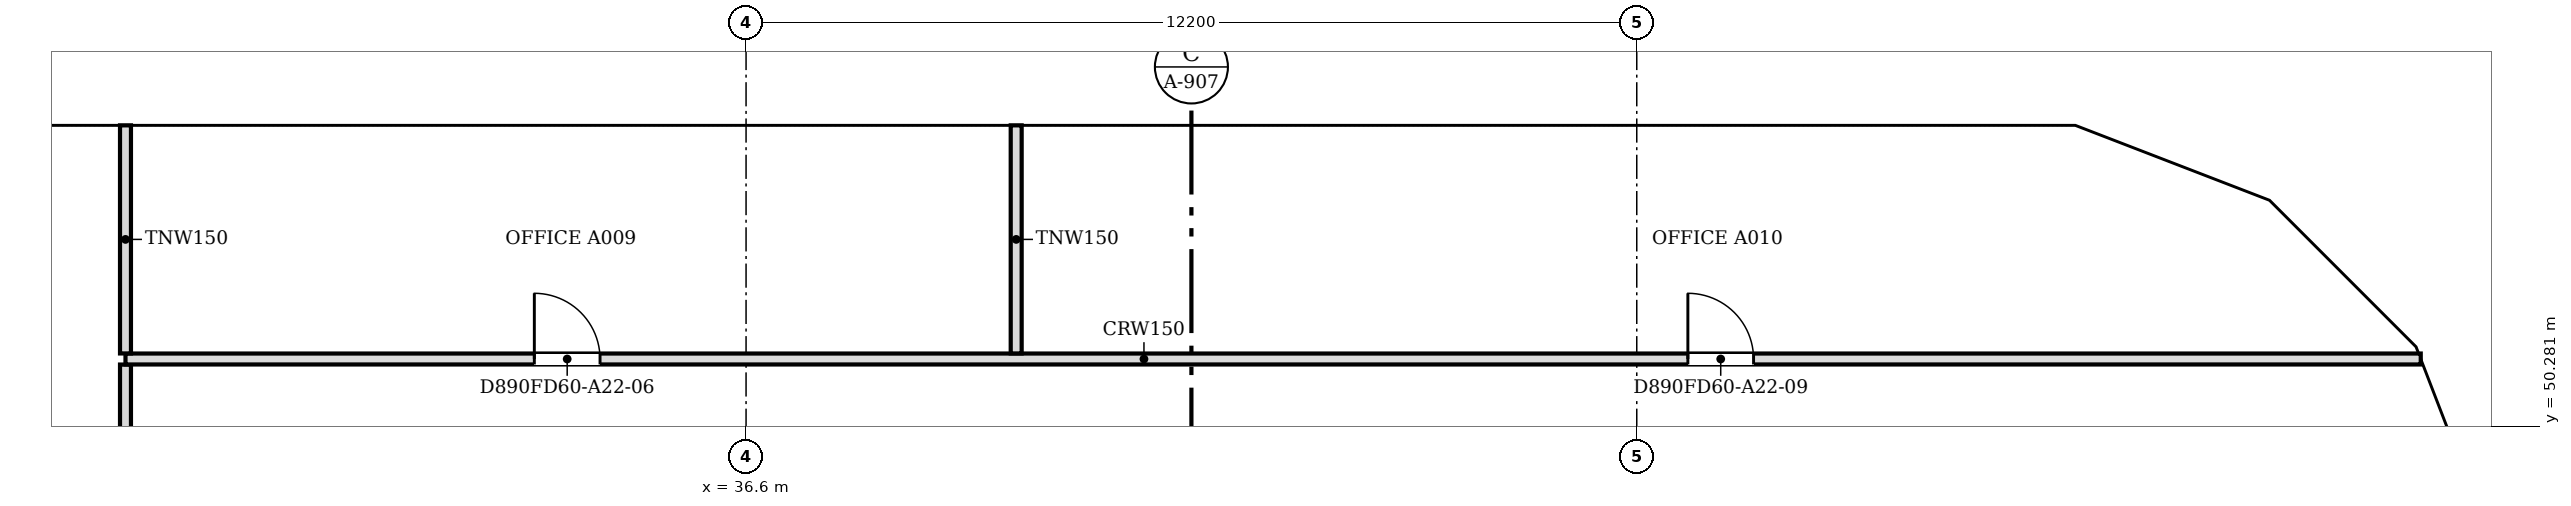
"""IFC4 building model, lengths in metres.
Left out: names, types, materials, properties, quantities, classifications, styles, units other than length and angle.
Written with IfcOpenShell. Run it as: python <this file> out.ifc"""

import sys

from ifc_helpers import new_model, si_unit, direction, frame, frame_2d, origin, place, context, subcontext, project, spatial, polyline, rectangle, outline, extrude, faceted_brep, source, transform, mapped, element, fill, save


model = new_model("IFC4")
c1 = context("Model", 3, precision=1e-05, world=origin(), true_north=direction((0.0, 1.0)))
c2 = subcontext(c1, "Body", "Model", "MODEL_VIEW")
j1 = project(units=[si_unit("LENGTHUNIT", "METRE"), si_unit("PLANEANGLEUNIT", "RADIAN")], contexts=[c1])
p1 = place(None, origin())
s1 = spatial("IfcSite", under=j1, at=p1, CompositionType="ELEMENT")
p2 = place(p1, origin())
s2 = spatial("IfcBuilding", under=s1, at=p2, CompositionType="ELEMENT")
p3 = place(p2, frame((0.0, 0.0, 255.9)))
s3 = spatial("IfcBuildingStorey", under=s2, at=p3, CompositionType="ELEMENT", Elevation=255.9)
m1 = source(origin(), c2, "Body", "Brep", [
    faceted_brep([(0.047, -0.25, 0.0), (2.997, -0.25, 3.8), (0.047, -0.25, 7.6), (0.0, -0.25, 7.541), (0.0, -0.25, 0.059), (0.093, 0.25, 7.54), (2.944, 0.25, 3.868), (2.944, 0.25, 3.732), (0.093, 0.25, 0.06), (2.997, 0.0, 3.8), (0.047, 0.0, 0.0), (0.047, 0.0, 7.6)], [[[0, 1, 2, 3, 4]], [[5, 6, 7, 8]], [[8, 7, 9, 1, 0, 10]], [[6, 5, 11, 2, 1, 9]], [[3, 2, 11]], [[10, 0, 4]], [[8, 10, 4, 3, 11, 5]], [[9, 7, 6]]]),
])
p4 = place(p3, frame((60.767, 48.71, -3.8), z_axis=(0.0, 0.0, 1.0), x_axis=(-0.359901446078, 0.932990326376, 0.0)))
e1 = element("IfcWall", 1, at=p4, inside=s3, PredefinedType="SOLIDWALL", context=c2, shape_type="MappedRepresentation", body=[
    mapped(m1, transform((0.0, 0.0, 0.0), scale=1.0)),
])
m2 = source(origin(), c2, "Body", "SweptSolid", [
    extrude(outline(polyline([(0.247, 0.665), (2.681, 3.8), (0.247, 6.935), (0.247, 0.665)])), frame((0.0, 0.26, 0.0), z_axis=(0.0, -1.0, 0.0), x_axis=(1.0, 0.0, 0.0)), (0.0, 0.0, 1.0), 0.52),
])
p5 = place(p4, origin())
e2 = element("IfcOpeningElement", 2, at=p5, cuts=e1, PredefinedType="OPENING", context=c2, shape_type="MappedRepresentation", body=[
    mapped(m2, transform((0.0, 0.0, 0.0), scale=1.0)),
])
m3 = source(origin(), c2, "Body", "Brep", [
    faceted_brep([(2.944, -0.25, 0.0), (2.997, -0.25, 0.068), (2.997, -0.25, 7.532), (2.944, -0.25, 7.6), (0.0, -0.25, 3.8), (0.053, 0.25, 3.868), (2.891, 0.25, 7.532), (2.891, 0.25, 0.068), (0.053, 0.25, 3.731), (2.944, 0.0, 0.0), (2.944, 0.0, 7.6), (0.0, 0.0, 3.8)], [[[0, 1, 2, 3, 4]], [[5, 6, 7, 8]], [[1, 0, 9]], [[10, 3, 2]], [[6, 5, 11, 4, 3, 10]], [[8, 7, 9, 0, 4, 11]], [[8, 11, 5]], [[1, 9, 7, 6, 10, 2]]]),
])
p6 = place(p3, frame((59.688, 51.506, -3.8), z_axis=(0.0, 0.0, 1.0), x_axis=(-0.707106781187, 0.707106781187, 0.0)))
e3 = element("IfcWall", 3, at=p6, inside=s3, PredefinedType="SOLIDWALL", context=c2, shape_type="MappedRepresentation", body=[
    mapped(m3, transform((0.0, 0.0, 0.0), scale=1.0)),
])
m4 = source(origin(), c2, "Body", "SweptSolid", [
    extrude(outline(polyline([(2.744, 6.934), (0.316, 3.8), (2.744, 0.666), (2.744, 6.934)])), frame((0.0, 0.26, 0.0), z_axis=(0.0, -1.0, 0.0), x_axis=(1.0, 0.0, 0.0)), (0.0, 0.0, 1.0), 0.52),
])
p7 = place(p6, origin())
e4 = element("IfcOpeningElement", 4, at=p7, cuts=e3, PredefinedType="OPENING", context=c2, shape_type="MappedRepresentation", body=[
    mapped(m4, transform((0.0, 0.0, 0.0), scale=1.0)),
])
m5 = source(origin(), c2, "Body", "Brep", [
    faceted_brep([(0.053, -0.25, 0.0), (3.003, -0.25, 3.8), (0.053, -0.25, 7.6), (0.0, -0.25, 7.531), (0.0, -0.25, 0.068), (0.106, 0.25, 7.532), (2.957, 0.25, 3.86), (2.957, 0.25, 3.74), (0.106, 0.25, 0.068), (3.003, 0.0, 3.8), (0.053, 0.0, 0.0), (0.053, 0.0, 7.6)], [[[0, 1, 2, 3, 4]], [[5, 6, 7, 8]], [[8, 7, 9, 1, 0, 10]], [[6, 5, 11, 2, 1, 9]], [[3, 2, 11]], [[10, 0, 4]], [[8, 10, 4, 3, 11, 5]], [[9, 7, 6]]]),
])
p8 = place(p3, frame((57.656, 53.569, -3.8), z_axis=(0.0, 0.0, 1.0), x_axis=(-0.933007896601, 0.359855894603, 0.0)))
e5 = element("IfcWall", 5, at=p8, inside=s3, PredefinedType="SOLIDWALL", context=c2, shape_type="MappedRepresentation", body=[
    mapped(m5, transform((0.0, 0.0, 0.0), scale=1.0)),
])
m6 = source(origin(), c2, "Body", "SweptSolid", [
    extrude(outline(polyline([(0.253, 0.665), (2.687, 3.8), (0.253, 6.935), (0.253, 0.665)])), frame((0.0, 0.26, 0.0), z_axis=(0.0, -1.0, 0.0), x_axis=(1.0, 0.0, 0.0)), (0.0, 0.0, 1.0), 0.52),
])
p9 = place(p8, origin())
e6 = element("IfcOpeningElement", 6, at=p9, cuts=e5, PredefinedType="OPENING", context=c2, shape_type="MappedRepresentation", body=[
    mapped(m6, transform((0.0, 0.0, 0.0), scale=1.0)),
])
m7 = source(origin(), c2, "Body", "Brep", [
    faceted_brep([(3.003, -0.25, 0.0), (6.053, -0.25, 3.8), (3.003, -0.25, 7.6), (0.0, -0.25, 3.8), (0.047, 0.25, 3.859), (3.003, 0.25, 7.6), (6.053, 0.25, 3.8), (3.003, 0.25, 0.0), (0.047, 0.25, 3.741), (0.0, 0.0, 3.8)], [[[0, 1, 2, 3]], [[4, 5, 6, 7, 8]], [[7, 6, 1, 0]], [[6, 5, 2, 1]], [[5, 4, 9, 3, 2]], [[8, 7, 0, 3, 9]], [[8, 9, 4]]]),
])
p10 = place(p3, frame((54.854, 54.65, -3.8), z_axis=(0.0, 0.0, 1.0), x_axis=(-1.0, 0.0, 0.0)))
e7 = element("IfcWall", 7, at=p10, inside=s3, PredefinedType="SOLIDWALL", context=c2, shape_type="MappedRepresentation", body=[
    mapped(m7, transform((0.0, 0.0, 0.0), scale=1.0)),
])
m8 = source(origin(), c2, "Body", "SweptSolid", [
    extrude(outline(polyline([(3.005, 0.401), (5.733, 3.8), (3.005, 7.199), (0.319, 3.8), (3.005, 0.401)])), frame((0.0, 0.26, 0.0), z_axis=(0.0, -1.0, 0.0), x_axis=(1.0, 0.0, 0.0)), (0.0, 0.0, 1.0), 0.52),
])
p11 = place(p10, origin())
e8 = element("IfcOpeningElement", 8, at=p11, cuts=e7, PredefinedType="OPENING", context=c2, shape_type="MappedRepresentation", body=[
    mapped(m8, transform((0.0, 0.0, 0.0), scale=1.0)),
])
m9 = source(origin(), c2, "Body", "SweptSolid", [
    extrude(outline(polyline([(3.05, 0.0), (6.1, 3.8), (3.05, 7.6), (0.0, 3.8), (3.05, 0.0)])), frame((0.0, 0.25, 0.0), z_axis=(0.0, -1.0, 0.0), x_axis=(1.0, 0.0, 0.0)), (0.0, 0.0, 1.0), 0.5),
])
p12 = place(p3, frame((48.8, 54.65, -3.8), z_axis=(0.0, 0.0, 1.0), x_axis=(-1.0, 0.0, 0.0)))
e9 = element("IfcWall", 9, at=p12, inside=s3, PredefinedType="SOLIDWALL", context=c2, shape_type="MappedRepresentation", body=[
    mapped(m9, transform((0.0, 0.0, 0.0), scale=1.0)),
])
m10 = source(origin(), c2, "Body", "SweptSolid", [
    extrude(outline(polyline([(3.05, 0.399), (5.78, 3.8), (3.05, 7.2), (0.321, 3.8), (3.05, 0.399)])), frame((0.0, 0.26, 0.0), z_axis=(0.0, -1.0, 0.0), x_axis=(1.0, 0.0, 0.0)), (0.0, 0.0, 1.0), 0.52),
])
p13 = place(p12, origin())
e10 = element("IfcOpeningElement", 10, at=p13, cuts=e9, PredefinedType="OPENING", context=c2, shape_type="MappedRepresentation", body=[
    mapped(m10, transform((0.0, 0.0, 0.0), scale=1.0)),
])
m11 = source(origin(), c2, "Body", "Brep", [
    faceted_brep([(3.05, -0.25, 0.0), (6.1, -0.25, 3.8), (6.1, -0.25, 3.8), (3.05, -0.25, 7.6), (0.0, -0.25, 3.8), (0.0, 0.25, 3.8), (3.05, 0.25, 7.6), (6.1, 0.25, 3.8), (6.1, 0.25, 3.8), (3.05, 0.25, 0.0)], [[[0, 1, 2, 3, 4]], [[5, 6, 7, 8, 9]], [[9, 8, 1, 0]], [[7, 6, 3, 2]], [[6, 5, 4, 3]], [[5, 9, 0, 4]], [[1, 8, 7, 2]]]),
])
p14 = place(p3, frame((42.7, 54.65, -3.8), z_axis=(0.0, 0.0, 1.0), x_axis=(-1.0, 0.0, 0.0)))
e11 = element("IfcWall", 11, at=p14, inside=s3, PredefinedType="SOLIDWALL", context=c2, shape_type="MappedRepresentation", body=[
    mapped(m11, transform((0.0, 0.0, 0.0), scale=1.0)),
])
p15 = place(p14, origin())
e12 = element("IfcOpeningElement", 12, at=p15, cuts=e11, PredefinedType="OPENING", context=c2, shape_type="MappedRepresentation", body=[
    mapped(m10, transform((0.0, 0.0, 0.0), scale=1.0)),
])
p16 = place(p3, frame((36.6, 54.65, -3.8), z_axis=(0.0, 0.0, 1.0), x_axis=(-1.0, 0.0, 0.0)))
e13 = element("IfcWall", 13, at=p16, inside=s3, PredefinedType="SOLIDWALL", context=c2, shape_type="MappedRepresentation", body=[
    mapped(m9, transform((0.0, 0.0, 0.0), scale=1.0)),
])
p17 = place(p16, origin())
e14 = element("IfcOpeningElement", 14, at=p17, cuts=e13, PredefinedType="OPENING", context=c2, shape_type="MappedRepresentation", body=[
    mapped(m10, transform((0.0, 0.0, 0.0), scale=1.0)),
])
p18 = place(p3, frame((30.5, 54.65, -3.8), z_axis=(0.0, 0.0, 1.0), x_axis=(-1.0, 0.0, 0.0)))
e15 = element("IfcWall", 15, at=p18, inside=s3, PredefinedType="SOLIDWALL", context=c2, shape_type="MappedRepresentation", body=[
    mapped(m9, transform((0.0, 0.0, 0.0), scale=1.0)),
])
p19 = place(p18, origin())
e16 = element("IfcOpeningElement", 16, at=p19, cuts=e15, PredefinedType="OPENING", context=c2, shape_type="MappedRepresentation", body=[
    mapped(m10, transform((0.0, 0.0, 0.0), scale=1.0)),
])
m12 = source(origin(), c2, "Body", "Brep", [
    faceted_brep([(2.95, -0.25, 0.0), (3.003, -0.25, 0.068), (3.003, -0.25, 3.8), (0.0, -0.25, 3.8), (0.047, 0.25, 3.8), (2.898, 0.25, 3.8), (2.898, 0.25, 0.068), (0.047, 0.25, 3.74), (2.95, 0.0, 0.0), (0.0, 0.0, 3.8)], [[[0, 1, 2, 3]], [[4, 5, 6, 7]], [[1, 0, 8]], [[5, 4, 9, 3, 2]], [[7, 6, 8, 0, 3, 9]], [[7, 9, 4]], [[1, 8, 6, 5, 2]]]),
])
p20 = place(p3, frame((60.75, 48.753, 0.0), z_axis=(0.0, 0.0, 1.0), x_axis=(-0.35992665181, 0.932980602862, 0.0)))
e17 = element("IfcWall", 17, at=p20, inside=s3, PredefinedType="SOLIDWALL", context=c2, shape_type="MappedRepresentation", body=[
    mapped(m12, transform((0.0, 0.0, 0.0), scale=1.0)),
])
m13 = source(origin(), c2, "Body", "SweptSolid", [
    extrude(outline(polyline([(2.75, 3.55), (0.511, 3.55), (2.75, 0.665), (2.75, 3.55)])), frame((0.0, 0.26, 0.0), z_axis=(0.0, -1.0, 0.0), x_axis=(1.0, 0.0, 0.0)), (0.0, 0.0, 1.0), 0.52),
])
p21 = place(p20, origin())
e18 = element("IfcOpeningElement", 18, at=p21, cuts=e17, PredefinedType="OPENING", context=c2, shape_type="MappedRepresentation", body=[
    mapped(m13, transform((0.0, 0.0, 0.0), scale=1.0)),
])
m14 = source(origin(), c2, "Body", "Brep", [
    faceted_brep([(0.053, -0.25, 0.0), (2.997, -0.25, 3.8), (0.0, -0.25, 3.8), (0.0, -0.25, 0.068), (0.106, 0.25, 3.8), (2.944, 0.25, 3.8), (2.944, 0.25, 3.732), (0.106, 0.25, 0.068), (2.997, 0.0, 3.8), (0.053, 0.0, 0.0)], [[[0, 1, 2, 3]], [[4, 5, 6, 7]], [[7, 6, 8, 1, 0, 9]], [[5, 4, 2, 1, 8]], [[9, 0, 3]], [[7, 9, 3, 2, 4]], [[6, 5, 8]]]),
])
p22 = place(p3, frame((59.726, 51.469, 0.0), z_axis=(0.0, 0.0, 1.0), x_axis=(-0.707106781187, 0.707106781187, 0.0)))
e19 = element("IfcWall", 19, at=p22, inside=s3, PredefinedType="SOLIDWALL", context=c2, shape_type="MappedRepresentation", body=[
    mapped(m14, transform((0.0, 0.0, 0.0), scale=1.0)),
])
m15 = source(origin(), c2, "Body", "SweptSolid", [
    extrude(outline(polyline([(0.253, 0.667), (2.487, 3.55), (0.253, 3.55), (0.253, 0.667)])), frame((0.0, 0.26, 0.0), z_axis=(0.0, -1.0, 0.0), x_axis=(1.0, 0.0, 0.0)), (0.0, 0.0, 1.0), 0.52),
])
p23 = place(p22, origin())
e20 = element("IfcOpeningElement", 20, at=p23, cuts=e19, PredefinedType="OPENING", context=c2, shape_type="MappedRepresentation", body=[
    mapped(m15, transform((0.0, 0.0, 0.0), scale=1.0)),
])
m16 = source(origin(), c2, "Body", "Brep", [
    faceted_brep([(2.95, -0.25, 0.0), (2.997, -0.25, 0.059), (2.997, -0.25, 3.8), (0.0, -0.25, 3.8), (0.053, 0.25, 3.8), (2.904, 0.25, 3.8), (2.904, 0.25, 0.06), (0.053, 0.25, 3.732), (2.95, 0.0, 0.0), (0.0, 0.0, 3.8)], [[[0, 1, 2, 3]], [[4, 5, 6, 7]], [[1, 0, 8]], [[5, 4, 9, 3, 2]], [[7, 6, 8, 0, 3, 9]], [[7, 9, 4]], [[1, 8, 6, 5, 2]]]),
])
p24 = place(p3, frame((57.606, 53.588, 0.0), z_axis=(0.0, 0.0, 1.0), x_axis=(-0.932990326376, 0.359901446078, 0.0)))
e21 = element("IfcWall", 21, at=p24, inside=s3, PredefinedType="SOLIDWALL", context=c2, shape_type="MappedRepresentation", body=[
    mapped(m16, transform((0.0, 0.0, 0.0), scale=1.0)),
])
p25 = place(p24, origin())
e22 = element("IfcOpeningElement", 22, at=p25, cuts=e21, PredefinedType="OPENING", context=c2, shape_type="MappedRepresentation", body=[
    mapped(m13, transform((0.0, 0.0, 0.0), scale=1.0)),
])
m17 = source(origin(), c2, "Body", "Brep", [
    faceted_brep([(0.047, -0.25, 0.0), (3.05, -0.25, 3.8), (0.0, -0.25, 3.8), (0.0, -0.25, 0.06), (0.093, 0.25, 3.8), (3.05, 0.25, 3.8), (0.093, 0.25, 0.059), (0.047, 0.0, 0.0)], [[[0, 1, 2, 3]], [[4, 5, 6]], [[6, 5, 1, 0, 7]], [[5, 4, 2, 1]], [[7, 0, 3]], [[6, 7, 3, 2, 4]]]),
])
p26 = place(p3, frame((54.9, 54.65, 0.0), z_axis=(0.0, 0.0, 1.0), x_axis=(-1.0, 0.0, 0.0)))
e23 = element("IfcWall", 23, at=p26, inside=s3, PredefinedType="SOLIDWALL", context=c2, shape_type="MappedRepresentation", body=[
    mapped(m17, transform((0.0, 0.0, 0.0), scale=1.0)),
])
m18 = source(origin(), c2, "Body", "SweptSolid", [
    extrude(outline(polyline([(0.247, 0.656), (2.534, 3.55), (0.247, 3.55), (0.247, 0.656)])), frame((0.0, 0.26, 0.0), z_axis=(0.0, -1.0, 0.0), x_axis=(1.0, 0.0, 0.0)), (0.0, 0.0, 1.0), 0.52),
])
p27 = place(p26, origin())
e24 = element("IfcOpeningElement", 24, at=p27, cuts=e23, PredefinedType="OPENING", context=c2, shape_type="MappedRepresentation", body=[
    mapped(m18, transform((0.0, 0.0, 0.0), scale=1.0)),
])
m19 = source(origin(), c2, "Body", "SweptSolid", [
    extrude(outline(polyline([(3.05, 0.0), (6.1, 3.8), (0.0, 3.8), (3.05, 0.0)])), frame((0.0, 0.25, 0.0), z_axis=(0.0, -1.0, 0.0), x_axis=(1.0, 0.0, 0.0)), (0.0, 0.0, 1.0), 0.5),
])
p28 = place(p3, frame((51.85, 54.65, 0.0), z_axis=(0.0, 0.0, 1.0), x_axis=(-1.0, 0.0, 0.0)))
e25 = element("IfcWall", 25, at=p28, inside=s3, PredefinedType="SOLIDWALL", context=c2, shape_type="MappedRepresentation", body=[
    mapped(m19, transform((0.0, 0.0, 0.0), scale=1.0)),
])
m20 = source(origin(), c2, "Body", "SweptSolid", [
    extrude(outline(polyline([(3.05, 0.399), (5.579, 3.55), (0.521, 3.55), (3.05, 0.399)])), frame((0.0, 0.26, 0.0), z_axis=(0.0, -1.0, 0.0), x_axis=(1.0, 0.0, 0.0)), (0.0, 0.0, 1.0), 0.52),
])
p29 = place(p28, origin())
e26 = element("IfcOpeningElement", 26, at=p29, cuts=e25, PredefinedType="OPENING", context=c2, shape_type="MappedRepresentation", body=[
    mapped(m20, transform((0.0, 0.0, 0.0), scale=1.0)),
])
p30 = place(p3, frame((45.75, 54.65, 0.0), z_axis=(0.0, 0.0, 1.0), x_axis=(-1.0, 0.0, 0.0)))
e27 = element("IfcWall", 27, at=p30, inside=s3, PredefinedType="SOLIDWALL", context=c2, shape_type="MappedRepresentation", body=[
    mapped(m19, transform((0.0, 0.0, 0.0), scale=1.0)),
])
p31 = place(p30, origin())
e28 = element("IfcOpeningElement", 28, at=p31, cuts=e27, PredefinedType="OPENING", context=c2, shape_type="MappedRepresentation", body=[
    mapped(m20, transform((0.0, 0.0, 0.0), scale=1.0)),
])
m21 = source(origin(), c2, "Body", "Brep", [
    faceted_brep([(3.05, -0.25, 0.0), (6.1, -0.25, 3.8), (6.1, -0.25, 3.8), (0.0, -0.25, 3.8), (0.0, 0.25, 3.8), (6.1, 0.25, 3.8), (6.1, 0.25, 3.8), (3.05, 0.25, 0.0)], [[[0, 1, 2, 3]], [[4, 5, 6, 7]], [[7, 6, 1, 0]], [[5, 4, 3, 2]], [[4, 7, 0, 3]], [[1, 6, 5, 2]]]),
])
p32 = place(p3, frame((39.65, 54.65, 0.0), z_axis=(0.0, 0.0, 1.0), x_axis=(-1.0, 0.0, 0.0)))
e29 = element("IfcWall", 29, at=p32, inside=s3, PredefinedType="SOLIDWALL", context=c2, shape_type="MappedRepresentation", body=[
    mapped(m21, transform((0.0, 0.0, 0.0), scale=1.0)),
])
p33 = place(p32, origin())
e30 = element("IfcOpeningElement", 30, at=p33, cuts=e29, PredefinedType="OPENING", context=c2, shape_type="MappedRepresentation", body=[
    mapped(m20, transform((0.0, 0.0, 0.0), scale=1.0)),
])
p34 = place(p3, frame((33.55, 54.65, 0.0), z_axis=(0.0, 0.0, 1.0), x_axis=(-1.0, 0.0, 0.0)))
e31 = element("IfcWall", 31, at=p34, inside=s3, PredefinedType="SOLIDWALL", context=c2, shape_type="MappedRepresentation", body=[
    mapped(m19, transform((0.0, 0.0, 0.0), scale=1.0)),
])
p35 = place(p34, origin())
e32 = element("IfcOpeningElement", 32, at=p35, cuts=e31, PredefinedType="OPENING", context=c2, shape_type="MappedRepresentation", body=[
    mapped(m20, transform((0.0, 0.0, 0.0), scale=1.0)),
])
p36 = place(p3, frame((27.45, 54.65, 0.0), z_axis=(0.0, 0.0, 1.0), x_axis=(-1.0, 0.0, 0.0)))
e33 = element("IfcWall", 33, at=p36, inside=s3, PredefinedType="SOLIDWALL", context=c2, shape_type="MappedRepresentation", body=[
    mapped(m21, transform((0.0, 0.0, 0.0), scale=1.0)),
])
p37 = place(p36, origin())
e34 = element("IfcOpeningElement", 34, at=p37, cuts=e33, PredefinedType="OPENING", context=c2, shape_type="MappedRepresentation", body=[
    mapped(m20, transform((0.0, 0.0, 0.0), scale=1.0)),
])
p38 = place(p3, frame((28.1, 48.176, 0.0), z_axis=(0.0, 0.0, 1.0), x_axis=(0.0, 1.0, 0.0)))
e35 = element("IfcWall", 35, at=p38, inside=s3, PredefinedType="PARTITIONING", context=c2, shape_type="SweptSolid", body=[
    extrude(rectangle(XDim=2.948, YDim=0.15, at=frame_2d((1.474, 0.0))), origin(), (0.0, 0.0, 1.0), 2.947),
])
p39 = place(p3, frame((28.1, 51.2, 0.0), z_axis=(0.0, 0.0, 1.0), x_axis=(1.0, 0.0, 0.0)))
e36 = element("IfcWall", 36, at=p39, inside=s3, PredefinedType="PARTITIONING", context=c2, shape_type="SweptSolid", body=[
    extrude(rectangle(XDim=31.438, YDim=0.15, at=frame_2d((15.719, 0.0))), origin(), (0.0, 0.0, 1.0), 2.947),
])
m22 = source(origin(), c2, "Body", "SweptSolid", [
    extrude(rectangle(XDim=0.9, YDim=2.1, at=frame_2d((0.45, 1.05))), frame((0.0, 0.085, 0.0), z_axis=(0.0, -1.0, 0.0), x_axis=(1.0, 0.0, 0.0)), (0.0, 0.0, 1.0), 0.17),
])
p40 = place(p39, frame((5.6, 0.0, 0.0)))
e37 = element("IfcOpeningElement", 37, at=p40, cuts=e36, PredefinedType="OPENING", context=c2, shape_type="MappedRepresentation", body=[
    mapped(m22, transform((0.0, 0.0, 0.0), scale=1.0)),
])
p41 = place(p39, frame((21.4, 0.0, 0.0)))
e38 = element("IfcOpeningElement", 38, at=p41, cuts=e36, PredefinedType="OPENING", context=c2, shape_type="MappedRepresentation", body=[
    mapped(m22, transform((0.0, 0.0, 0.0), scale=1.0)),
])
for number, where, z_axis, x_axis in (
    (39, (28.1, 51.276, 0.0), (0.0, 0.0, 1.0), (0.0, 1.0, 0.0)),
    (40, (40.3, 51.276, 0.0), (0.0, 0.0, 1.0), (0.0, 1.0, 0.0)),
):
    element("IfcWall", number, at=place(p3, frame(where, z_axis=z_axis, x_axis=x_axis)), inside=s3, PredefinedType="PARTITIONING", context=c2, shape_type="SweptSolid", body=[
        extrude(rectangle(XDim=3.124, YDim=0.15, at=frame_2d((1.562, 0.0))), origin(), (0.0, 0.0, 1.0), 2.947),
    ])
m23 = source(origin(), c2, "Body", "SweptSolid", [
    extrude(rectangle(XDim=0.9, YDim=2.1, at=frame_2d((0.45, 1.05))), frame((0.0, 0.025, 0.0), z_axis=(0.0, -1.0, 0.0), x_axis=(1.0, 0.0, 0.0)), (0.0, 0.0, 1.0), 0.05),
])
p42 = place(p40, origin())
e41 = element("IfcDoor", 41, at=p42, inside=s3, OperationType="SINGLE_SWING_LEFT", PredefinedType="DOOR", context=c2, shape_type="MappedRepresentation", body=[
    mapped(m23, transform((0.0, 0.0, 0.0), scale=1.0)),
])
fill(e37, e41)
p43 = place(p41, origin())
e42 = element("IfcDoor", 42, at=p43, inside=s3, OperationType="SINGLE_SWING_LEFT", PredefinedType="DOOR", context=c2, shape_type="MappedRepresentation", body=[
    mapped(m23, transform((0.0, 0.0, 0.0), scale=1.0)),
])
fill(e38, e42)
save(model, sys.argv[1])
